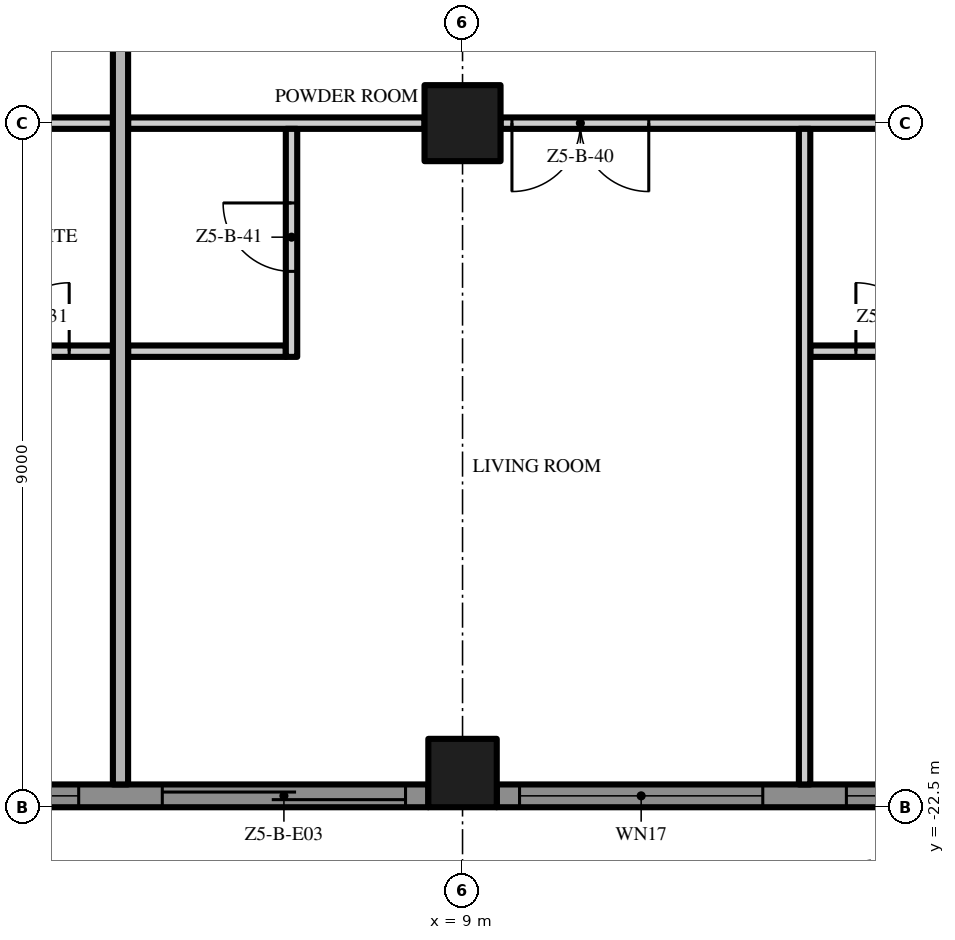
"""IFC4 building model, lengths in metres.
Left out: names, types, materials, properties, quantities, classifications, styles, units other than length and angle.
Written with IfcOpenShell. Run it as: python <this file> out.ifc"""

import sys

from ifc_helpers import new_model, si_unit, direction, frame, frame_2d, origin, origin_2d, place, context, subcontext, project, spatial, polyline, rectangle, outline, extrude, element, fill, save


model = new_model("IFC4")
c1 = context("Model", 3, precision=1e-05, world=origin(), true_north=direction((0.0, 1.0)))
c2 = subcontext(c1, "Body", "Model", "MODEL_VIEW")
j1 = project(units=[si_unit("LENGTHUNIT", "METRE"), si_unit("PLANEANGLEUNIT", "RADIAN")], contexts=[c1])
p1 = place(None, origin())
s1 = spatial("IfcSite", under=j1, at=p1, CompositionType="ELEMENT")
p2 = place(p1, origin())
s2 = spatial("IfcBuilding", under=s1, at=p2, CompositionType="ELEMENT")
p3 = place(p2, frame((0.0, 0.0, 250.2)))
s3 = spatial("IfcBuildingStorey", under=s2, at=p3, CompositionType="ELEMENT", Elevation=250.2)
p4 = place(p3, frame((9.0, -13.5, 0.0), z_axis=(0.0, 0.0, 1.0), x_axis=(1.0, 0.0, 0.0)))
e1 = element("IfcColumn", 1, at=p4, inside=s3, PredefinedType="COLUMN", context=c2, shape_type="SweptSolid", body=[
    extrude(rectangle(XDim=1.0, YDim=1.0, at=origin_2d()), origin(), (0.0, 0.0, 1.0), 3.5),
])
p5 = place(p3, frame((9.0, -22.05, 0.0), z_axis=(0.0, 0.0, 1.0), x_axis=(1.0, 0.0, 0.0)))
e2 = element("IfcColumn", 2, at=p5, inside=s3, PredefinedType="COLUMN", context=c2, shape_type="SweptSolid", body=[
    extrude(rectangle(XDim=0.9, YDim=0.9, at=origin_2d()), origin(), (0.0, 0.0, 1.0), 3.5),
])
p6 = place(p3, frame((8.55, -22.35, 0.0), z_axis=(0.0, 0.0, 1.0), x_axis=(-1.0, 0.0, 0.0)))
e3 = element("IfcWall", 3, at=p6, inside=s3, PredefinedType="SOLIDWALL", context=c2, shape_type="SweptSolid", body=[
    extrude(rectangle(XDim=8.1, YDim=0.3, at=frame_2d((4.05, 0.0))), origin(), (0.0, 0.0, 1.0), 3.5),
])
p7 = place(p6, frame((4.6, 0.0, 0.45)))
e4 = element("IfcOpeningElement", 4, at=p7, cuts=e3, PredefinedType="OPENING", context=c2, shape_type="SweptSolid", body=[
    extrude(rectangle(XDim=3.2, YDim=2.65, at=frame_2d((1.6, 1.325))), frame((0.0, 0.16, 0.0), z_axis=(0.0, -1.0, 0.0), x_axis=(1.0, 0.0, 0.0)), (0.0, 0.0, 1.0), 0.32),
])
p8 = place(p6, frame((0.3, 0.0, 0.0)))
e5 = element("IfcOpeningElement", 5, at=p8, cuts=e3, PredefinedType="OPENING", context=c2, shape_type="SweptSolid", body=[
    extrude(rectangle(XDim=3.2, YDim=2.4, at=frame_2d((1.6, 1.2))), frame((0.0, 0.16, 0.0), z_axis=(0.0, -1.0, 0.0), x_axis=(1.0, 0.0, 0.0)), (0.0, 0.0, 1.0), 0.32),
])
p9 = place(p3, frame((17.55, -22.35, 0.0), z_axis=(0.0, 0.0, 1.0), x_axis=(-1.0, 0.0, 0.0)))
e6 = element("IfcWall", 6, at=p9, inside=s3, PredefinedType="SOLIDWALL", context=c2, shape_type="SweptSolid", body=[
    extrude(rectangle(XDim=8.1, YDim=0.3, at=frame_2d((4.05, 0.0))), origin(), (0.0, 0.0, 1.0), 3.5),
])
p10 = place(p9, frame((4.6, 0.0, 0.45)))
e7 = element("IfcOpeningElement", 7, at=p10, cuts=e6, PredefinedType="OPENING", context=c2, shape_type="SweptSolid", body=[
    extrude(rectangle(XDim=3.2, YDim=2.65, at=frame_2d((1.6, 1.325))), frame((0.0, 0.16, 0.0), z_axis=(0.0, -1.0, 0.0), x_axis=(1.0, 0.0, 0.0)), (0.0, 0.0, 1.0), 0.32),
])
p11 = place(p9, frame((0.3, 0.0, 0.45)))
e8 = element("IfcOpeningElement", 8, at=p11, cuts=e6, PredefinedType="OPENING", context=c2, shape_type="SweptSolid", body=[
    extrude(rectangle(XDim=3.2, YDim=2.65, at=frame_2d((1.6, 1.325))), frame((0.0, 0.16, 0.0), z_axis=(0.0, -1.0, 0.0), x_axis=(1.0, 0.0, 0.0)), (0.0, 0.0, 1.0), 0.32),
])
p12 = place(p3, origin())
e9 = element("IfcWall", 9, at=p12, inside=s3, PredefinedType="USERDEFINED", context=c2, shape_type="SweptSolid", body=[
    extrude(outline(polyline([(-22.5, -25.5), (-21.0, -25.271), (-19.5, -24.671), (-18.0, -23.929), (-16.5, -23.329), (-15.0, -23.1), (-13.5, -23.329), (-12.0, -23.929), (-10.5, -24.671), (-9.0, -25.271), (-7.5, -25.5), (-6.0, -25.271), (-4.5, -24.671), (-3.0, -23.929), (-1.5, -23.329), (0.0, -23.1), (1.5, -23.329), (3.0, -23.929), (4.5, -24.671), (6.0, -25.271), (7.5, -25.5), (9.0, -25.271), (10.5, -24.671), (12.0, -23.929), (13.5, -23.329), (15.0, -23.1), (16.5, -23.329), (18.0, -23.929), (19.5, -24.671), (21.0, -25.271), (22.5, -25.5), (22.538, -25.253), (21.066, -25.028), (19.602, -24.442), (18.102, -23.701), (16.566, -23.086), (15.0, -22.847), (13.434, -23.086), (11.898, -23.701), (10.398, -24.442), (8.934, -25.028), (7.5, -25.247), (6.066, -25.028), (4.602, -24.442), (3.102, -23.701), (1.566, -23.086), (0.0, -22.847), (-1.566, -23.086), (-3.102, -23.701), (-4.602, -24.442), (-6.066, -25.028), (-7.5, -25.247), (-8.934, -25.028), (-10.398, -24.442), (-11.898, -23.701), (-13.434, -23.086), (-15.0, -22.847), (-16.566, -23.086), (-18.102, -23.701), (-19.602, -24.442), (-21.066, -25.028), (-22.538, -25.253), (-22.5, -25.5)])), origin(), (0.0, 0.0, 1.0), 0.9),
])
p13 = place(p3, frame((2.325, -16.5, 0.0), z_axis=(0.0, 0.0, 1.0), x_axis=(1.0, 0.0, 0.0)))
e10 = element("IfcWall", 10, at=p13, inside=s3, PredefinedType="PARTITIONING", context=c2, shape_type="SweptSolid", body=[
    extrude(rectangle(XDim=2.075, YDim=0.15, at=frame_2d((1.038, 0.0))), origin(), (0.0, 0.0, 1.0), 3.5),
])
p14 = place(p13, frame((0.6, 0.0, 0.0)))
e11 = element("IfcOpeningElement", 11, at=p14, cuts=e10, PredefinedType="OPENING", context=c2, shape_type="SweptSolid", body=[
    extrude(rectangle(XDim=0.9, YDim=2.1, at=frame_2d((0.45, 1.05))), frame((0.0, 0.085, 0.0), z_axis=(0.0, -1.0, 0.0), x_axis=(1.0, 0.0, 0.0)), (0.0, 0.0, 1.0), 0.17),
])
p15 = place(p3, frame((4.6, -16.5, 0.0), z_axis=(0.0, 0.0, 1.0), x_axis=(1.0, 0.0, 0.0)))
e12 = element("IfcWall", 12, at=p15, inside=s3, PredefinedType="PARTITIONING", context=c2, shape_type="SweptSolid", body=[
    extrude(rectangle(XDim=2.075, YDim=0.15, at=frame_2d((1.038, 0.0))), origin(), (0.0, 0.0, 1.0), 3.5),
])
p16 = place(p3, frame((13.575, -16.5, 0.0), z_axis=(0.0, 0.0, 1.0), x_axis=(1.0, 0.0, 0.0)))
e13 = element("IfcWall", 13, at=p16, inside=s3, PredefinedType="PARTITIONING", context=c2, shape_type="SweptSolid", body=[
    extrude(rectangle(XDim=2.1, YDim=0.15, at=frame_2d((1.05, 0.0))), origin(), (0.0, 0.0, 1.0), 3.5),
])
p17 = place(p16, frame((0.6, 0.0, 0.0)))
e14 = element("IfcOpeningElement", 14, at=p17, cuts=e13, PredefinedType="OPENING", context=c2, shape_type="SweptSolid", body=[
    extrude(rectangle(XDim=0.9, YDim=2.1, at=frame_2d((0.45, 1.05))), frame((0.0, 0.085, 0.0), z_axis=(0.0, -1.0, 0.0), x_axis=(1.0, 0.0, 0.0)), (0.0, 0.0, 1.0), 0.17),
])
p18 = place(p3, frame((4.4, -13.5, 0.0), z_axis=(0.0, 0.0, 1.0), x_axis=(-1.0, 0.0, 0.0)))
e15 = element("IfcWall", 15, at=p18, inside=s3, PredefinedType="PARTITIONING", context=c2, shape_type="SweptSolid", body=[
    extrude(rectangle(XDim=3.9, YDim=0.15, at=frame_2d((1.95, 0.0))), origin(), (0.0, 0.0, 1.0), 3.5),
])
p19 = place(p18, frame((2.75, 0.0, 0.0)))
e16 = element("IfcOpeningElement", 16, at=p19, cuts=e15, PredefinedType="OPENING", context=c2, shape_type="SweptSolid", body=[
    extrude(rectangle(XDim=1.0, YDim=2.4, at=frame_2d((0.5, 1.2))), frame((0.0, 0.085, 0.0), z_axis=(0.0, -1.0, 0.0), x_axis=(1.0, 0.0, 0.0)), (0.0, 0.0, 1.0), 0.17),
])
p20 = place(p3, frame((4.6, -13.5, 0.0), z_axis=(0.0, 0.0, 1.0), x_axis=(1.0, 0.0, 0.0)))
e17 = element("IfcWall", 17, at=p20, inside=s3, PredefinedType="PARTITIONING", context=c2, shape_type="SweptSolid", body=[
    extrude(rectangle(XDim=3.9, YDim=0.15, at=frame_2d((1.95, 0.0))), origin(), (0.0, 0.0, 1.0), 3.5),
])
p21 = place(p3, frame((17.5, -13.5, 0.0), z_axis=(0.0, 0.0, 1.0), x_axis=(-1.0, 0.0, 0.0)))
e18 = element("IfcWall", 18, at=p21, inside=s3, PredefinedType="PARTITIONING", context=c2, shape_type="SweptSolid", body=[
    extrude(rectangle(XDim=8.0, YDim=0.15, at=frame_2d((4.0, 0.0))), origin(), (0.0, 0.0, 1.0), 3.5),
])
p22 = place(p21, frame((6.05, 0.0, 0.0)))
e19 = element("IfcOpeningElement", 19, at=p22, cuts=e18, PredefinedType="OPENING", context=c2, shape_type="SweptSolid", body=[
    extrude(rectangle(XDim=1.8, YDim=2.4, at=frame_2d((0.9, 1.2))), frame((0.0, 0.085, 0.0), z_axis=(0.0, -1.0, 0.0), x_axis=(1.0, 0.0, 0.0)), (0.0, 0.0, 1.0), 0.17),
])
p23 = place(p21, frame((0.15, 0.0, 0.0)))
e20 = element("IfcOpeningElement", 20, at=p23, cuts=e18, PredefinedType="OPENING", context=c2, shape_type="SweptSolid", body=[
    extrude(rectangle(XDim=1.0, YDim=2.4, at=frame_2d((0.5, 1.2))), frame((0.0, 0.085, 0.0), z_axis=(0.0, -1.0, 0.0), x_axis=(1.0, 0.0, 0.0)), (0.0, 0.0, 1.0), 0.17),
])
p24 = place(p3, frame((4.5, -22.2, 0.0), z_axis=(0.0, 0.0, 1.0), x_axis=(0.0, 1.0, 0.0)))
e21 = element("IfcWall", 21, at=p24, inside=s3, PredefinedType="PARTITIONING", context=c2, shape_type="SweptSolid", body=[
    extrude(rectangle(XDim=22.1, YDim=0.2, at=frame_2d((11.05, 0.0))), origin(), (0.0, 0.0, 1.0), 3.5),
])
p25 = place(p3, frame((6.75, -16.575, 0.0), z_axis=(0.0, 0.0, 1.0), x_axis=(0.0, 1.0, 0.0)))
e22 = element("IfcWall", 22, at=p25, inside=s3, PredefinedType="PARTITIONING", context=c2, shape_type="SweptSolid", body=[
    extrude(rectangle(XDim=3.0, YDim=0.15, at=frame_2d((1.5, 0.0))), origin(), (0.0, 0.0, 1.0), 3.5),
])
p26 = place(p25, frame((1.125, 0.0, 0.0)))
e23 = element("IfcOpeningElement", 23, at=p26, cuts=e22, PredefinedType="OPENING", context=c2, shape_type="SweptSolid", body=[
    extrude(rectangle(XDim=0.9, YDim=2.1, at=frame_2d((0.45, 1.05))), frame((0.0, 0.085, 0.0), z_axis=(0.0, -1.0, 0.0), x_axis=(1.0, 0.0, 0.0)), (0.0, 0.0, 1.0), 0.17),
])
p27 = place(p3, frame((13.5, -22.2, 0.0), z_axis=(0.0, 0.0, 1.0), x_axis=(0.0, 1.0, 0.0)))
e24 = element("IfcWall", 24, at=p27, inside=s3, PredefinedType="PARTITIONING", context=c2, shape_type="SweptSolid", body=[
    extrude(rectangle(XDim=8.625, YDim=0.15, at=frame_2d((4.312, 0.0))), origin(), (0.0, 0.0, 1.0), 3.5),
])
p28 = place(p7, origin())
e25 = element("IfcWindow", 25, at=p28, inside=s3, PartitioningType="SINGLE_PANEL", PredefinedType="WINDOW", context=c2, shape_type="SweptSolid", body=[
    extrude(rectangle(XDim=3.2, YDim=2.65, at=frame_2d((1.6, 1.325))), frame((0.0, 0.03, 0.0), z_axis=(0.0, -1.0, 0.0), x_axis=(1.0, 0.0, 0.0)), (0.0, 0.0, 1.0), 0.06),
])
fill(e4, e25)
p29 = place(p8, origin())
e26 = element("IfcDoor", 26, at=p29, inside=s3, OperationType="SINGLE_SWING_LEFT", PredefinedType="DOOR", context=c2, shape_type="SweptSolid", body=[
    extrude(rectangle(XDim=3.2, YDim=2.4, at=frame_2d((1.6, 1.2))), frame((0.0, 0.025, 0.0), z_axis=(0.0, -1.0, 0.0), x_axis=(1.0, 0.0, 0.0)), (0.0, 0.0, 1.0), 0.05),
])
fill(e5, e26)
p30 = place(p10, origin())
e27 = element("IfcWindow", 27, at=p30, inside=s3, PartitioningType="SINGLE_PANEL", PredefinedType="WINDOW", context=c2, shape_type="SweptSolid", body=[
    extrude(rectangle(XDim=3.2, YDim=2.65, at=frame_2d((1.6, 1.325))), frame((0.0, 0.03, 0.0), z_axis=(0.0, -1.0, 0.0), x_axis=(1.0, 0.0, 0.0)), (0.0, 0.0, 1.0), 0.06),
])
fill(e7, e27)
p31 = place(p11, origin())
e28 = element("IfcWindow", 28, at=p31, inside=s3, PartitioningType="SINGLE_PANEL", PredefinedType="WINDOW", context=c2, shape_type="SweptSolid", body=[
    extrude(rectangle(XDim=3.2, YDim=2.65, at=frame_2d((1.6, 1.325))), frame((0.0, 0.03, 0.0), z_axis=(0.0, -1.0, 0.0), x_axis=(1.0, 0.0, 0.0)), (0.0, 0.0, 1.0), 0.06),
])
fill(e8, e28)
p32 = place(p14, origin())
e29 = element("IfcDoor", 29, at=p32, inside=s3, OperationType="SINGLE_SWING_RIGHT", PredefinedType="DOOR", context=c2, shape_type="SweptSolid", body=[
    extrude(rectangle(XDim=0.9, YDim=2.1, at=frame_2d((0.45, 1.05))), frame((0.0, 0.025, 0.0), z_axis=(0.0, -1.0, 0.0), x_axis=(1.0, 0.0, 0.0)), (0.0, 0.0, 1.0), 0.05),
])
fill(e11, e29)
p33 = place(p22, origin())
e30 = element("IfcDoor", 30, at=p33, inside=s3, OperationType="DOUBLE_DOOR_SINGLE_SWING", PredefinedType="DOOR", context=c2, shape_type="SweptSolid", body=[
    extrude(rectangle(XDim=1.8, YDim=2.4, at=frame_2d((0.9, 1.2))), frame((0.0, 0.025, 0.0), z_axis=(0.0, -1.0, 0.0), x_axis=(1.0, 0.0, 0.0)), (0.0, 0.0, 1.0), 0.05),
])
fill(e19, e30)
p34 = place(p26, origin())
e31 = element("IfcDoor", 31, at=p34, inside=s3, OperationType="SINGLE_SWING_RIGHT", PredefinedType="DOOR", context=c2, shape_type="SweptSolid", body=[
    extrude(rectangle(XDim=0.9, YDim=2.1, at=frame_2d((0.45, 1.05))), frame((0.0, 0.025, 0.0), z_axis=(0.0, -1.0, 0.0), x_axis=(1.0, 0.0, 0.0)), (0.0, 0.0, 1.0), 0.05),
])
fill(e23, e31)
p35 = place(p17, origin())
e32 = element("IfcDoor", 32, at=p35, inside=s3, OperationType="SINGLE_SWING_LEFT", PredefinedType="DOOR", context=c2, shape_type="SweptSolid", body=[
    extrude(rectangle(XDim=0.9, YDim=2.1, at=frame_2d((0.45, 1.05))), frame((0.0, 0.025, 0.0), z_axis=(0.0, -1.0, 0.0), x_axis=(1.0, 0.0, 0.0)), (0.0, 0.0, 1.0), 0.05),
])
fill(e14, e32)
save(model, sys.argv[1])
